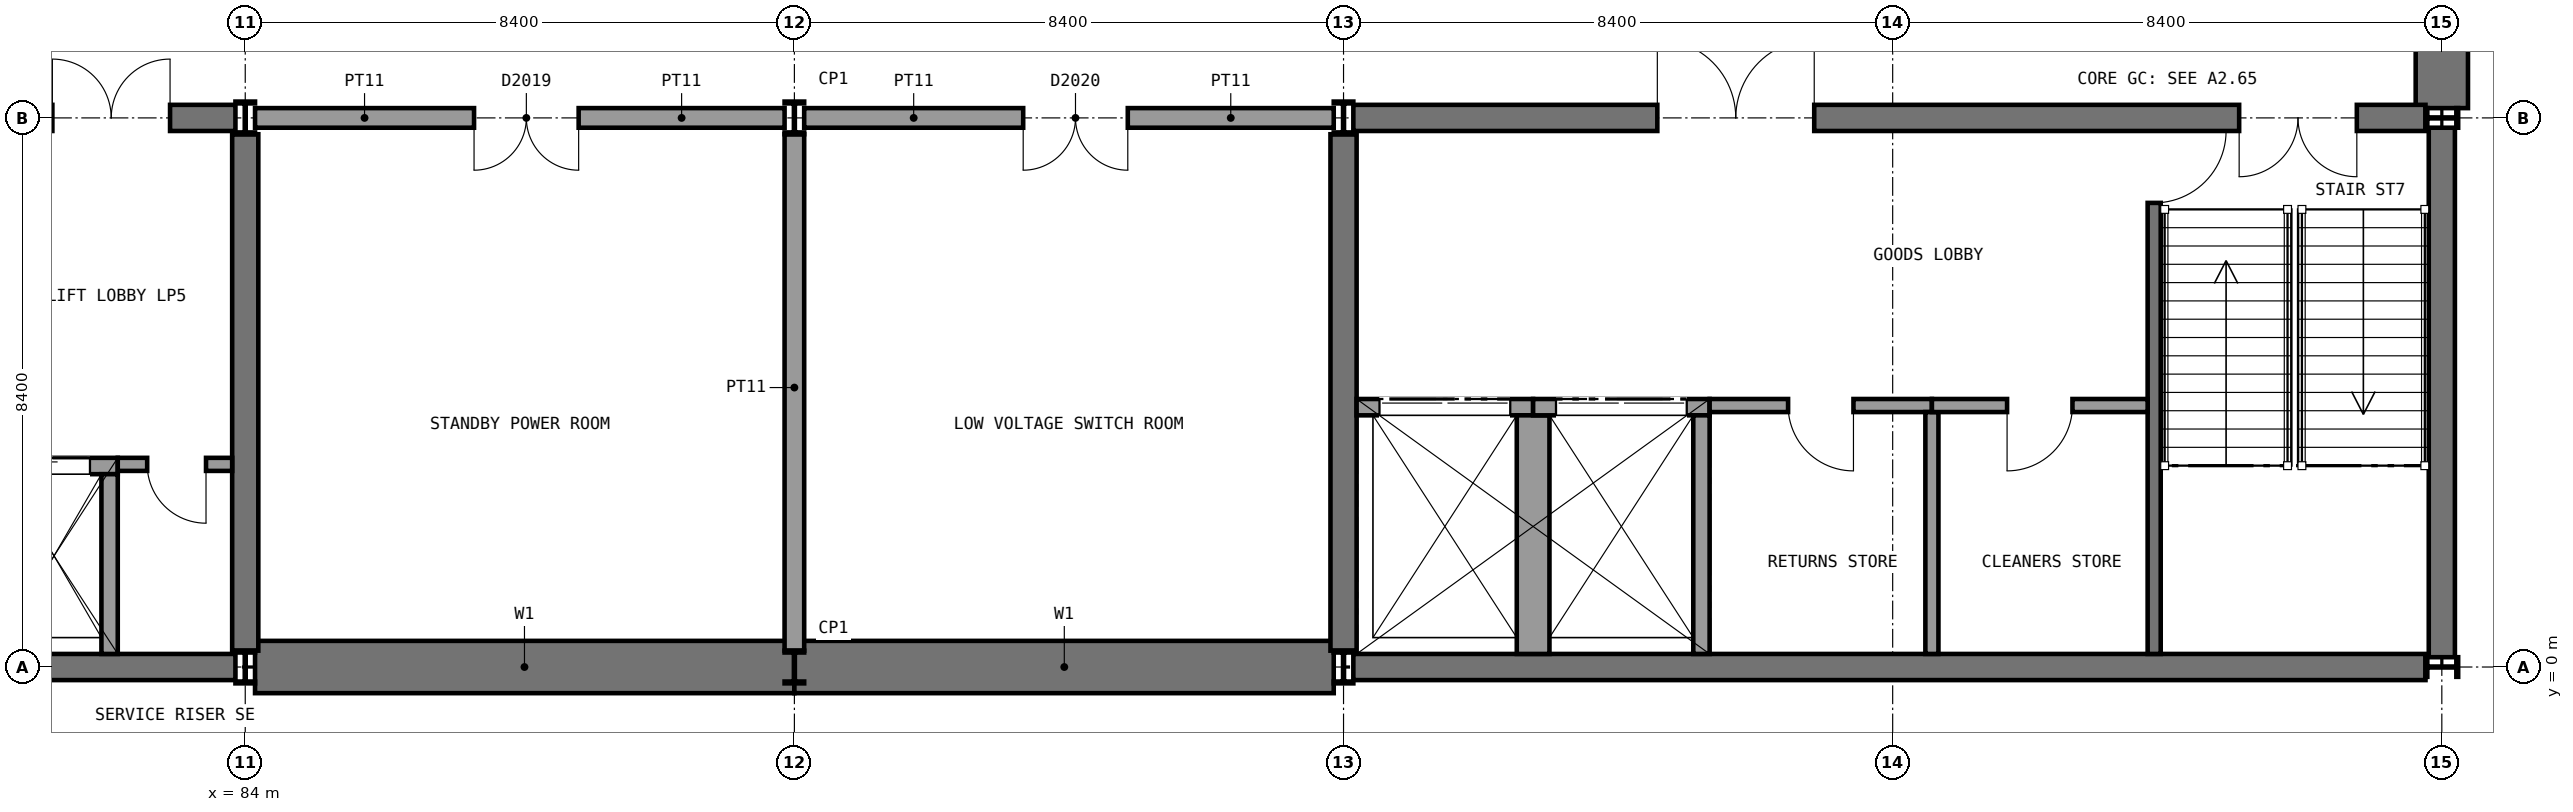
"""IFC4 building model, lengths in metres.
Left out: names, types, materials, properties, quantities, classifications, styles, units other than length and angle.
Written with IfcOpenShell. Run it as: python <this file> out.ifc"""

import sys

from ifc_helpers import new_model, si_unit, direction, frame, frame_2d, origin, origin_2d, place, context, subcontext, project, spatial, rectangle, i_section, extrude, element, fill, save


model = new_model("IFC4")
c1 = context("Model", 3, precision=1e-05, world=origin(), true_north=direction((0.0, 1.0)))
c2 = subcontext(c1, "Body", "Model", "MODEL_VIEW")
j1 = project(units=[si_unit("LENGTHUNIT", "METRE"), si_unit("PLANEANGLEUNIT", "RADIAN")], contexts=[c1])
p1 = place(None, origin())
s1 = spatial("IfcSite", under=j1, at=p1, CompositionType="ELEMENT")
p2 = place(p1, origin())
s2 = spatial("IfcBuilding", under=s1, at=p2, CompositionType="ELEMENT")
p3 = place(p2, frame((0.0, 0.0, -9.9)))
s3 = spatial("IfcBuildingStorey", under=s2, at=p3, CompositionType="ELEMENT", Elevation=-9.9)
p4 = place(p3, frame((84.15, 0.0, 0.0), z_axis=(0.0, 0.0, 1.0), x_axis=(1.0, 0.0, 0.0)))
e1 = element("IfcWall", 1, at=p4, inside=s3, PredefinedType="SOLIDWALL", context=c2, shape_type="SweptSolid", body=[
    extrude(rectangle(XDim=8.25, YDim=0.8, at=frame_2d((4.125, 0.0))), origin(), (0.0, 0.0, 1.0), 4.65),
])
for number, where, z_axis, x_axis in (
    (2, (92.4, 0.0, 0.0), (0.0, 0.0, 1.0), (1.0, 0.0, 0.0)),
    (3, (117.6, 8.55, 0.0), (0.0, 0.0, 1.0), (0.0, 1.0, 0.0)),
):
    element("IfcWall", number, at=place(p3, frame(where, z_axis=z_axis, x_axis=x_axis)), inside=s3, PredefinedType="SOLIDWALL", context=c2, shape_type="SweptSolid", body=[
        extrude(rectangle(XDim=8.25, YDim=0.8, at=frame_2d((4.125, 0.0))), origin(), (0.0, 0.0, 1.0), 4.65),
    ])
p5 = place(p3, frame((75.75, 0.0, 0.0), z_axis=(0.0, 0.0, 1.0), x_axis=(1.0, 0.0, 0.0)))
e4 = element("IfcWall", 4, at=p5, inside=s3, PredefinedType="SHEAR", context=c2, shape_type="SweptSolid", body=[
    extrude(rectangle(XDim=8.1, YDim=0.4, at=frame_2d((4.05, 0.0))), origin(), (0.0, 0.0, 1.0), 4.65),
])
p6 = place(p3, frame((75.75, 8.4, 0.0), z_axis=(0.0, 0.0, 1.0), x_axis=(1.0, 0.0, 0.0)))
e5 = element("IfcWall", 5, at=p6, inside=s3, PredefinedType="SHEAR", context=c2, shape_type="SweptSolid", body=[
    extrude(rectangle(XDim=8.1, YDim=0.4, at=frame_2d((4.05, 0.0))), origin(), (0.0, 0.0, 1.0), 4.65),
])
p7 = place(p6, frame((1.15, 0.0, 0.0)))
e6 = element("IfcOpeningElement", 6, at=p7, cuts=e5, PredefinedType="OPENING", context=c2, shape_type="SweptSolid", body=[
    extrude(rectangle(XDim=1.8, YDim=2.1, at=frame_2d((0.9, 1.05))), frame((0.0, 0.21, 0.0), z_axis=(0.0, -1.0, 0.0), x_axis=(1.0, 0.0, 0.0)), (0.0, 0.0, 1.0), 0.42),
])
p8 = place(p6, frame((5.3, 0.0, 0.0)))
e7 = element("IfcOpeningElement", 7, at=p8, cuts=e5, PredefinedType="OPENING", context=c2, shape_type="SweptSolid", body=[
    extrude(rectangle(XDim=1.8, YDim=2.1, at=frame_2d((0.9, 1.05))), frame((0.0, 0.21, 0.0), z_axis=(0.0, -1.0, 0.0), x_axis=(1.0, 0.0, 0.0)), (0.0, 0.0, 1.0), 0.42),
])
p9 = place(p3, frame((84.0, 0.25, 0.0), z_axis=(0.0, 0.0, 1.0), x_axis=(0.0, 1.0, 0.0)))
e8 = element("IfcWall", 8, at=p9, inside=s3, PredefinedType="SHEAR", context=c2, shape_type="SweptSolid", body=[
    extrude(rectangle(XDim=7.9, YDim=0.4, at=frame_2d((3.95, 0.0))), origin(), (0.0, 0.0, 1.0), 4.65),
])
p10 = place(p3, frame((100.95, 0.0, 0.0), z_axis=(0.0, 0.0, 1.0), x_axis=(1.0, 0.0, 0.0)))
e9 = element("IfcWall", 9, at=p10, inside=s3, PredefinedType="SHEAR", context=c2, shape_type="SweptSolid", body=[
    extrude(rectangle(XDim=16.4, YDim=0.4, at=frame_2d((8.2, 0.0))), origin(), (0.0, 0.0, 1.0), 4.65),
])
p11 = place(p3, frame((100.95, 8.4, 0.0), z_axis=(0.0, 0.0, 1.0), x_axis=(1.0, 0.0, 0.0)))
e10 = element("IfcWall", 10, at=p11, inside=s3, PredefinedType="SHEAR", context=c2, shape_type="SweptSolid", body=[
    extrude(rectangle(XDim=16.4, YDim=0.4, at=frame_2d((8.2, 0.0))), origin(), (0.0, 0.0, 1.0), 4.65),
])
p12 = place(p11, frame((13.55, 0.0, 0.0)))
e11 = element("IfcOpeningElement", 11, at=p12, cuts=e10, PredefinedType="OPENING", context=c2, shape_type="SweptSolid", body=[
    extrude(rectangle(XDim=1.8, YDim=2.1, at=frame_2d((0.9, 1.05))), frame((0.0, 0.21, 0.0), z_axis=(0.0, -1.0, 0.0), x_axis=(1.0, 0.0, 0.0)), (0.0, 0.0, 1.0), 0.42),
])
p13 = place(p11, frame((4.65, 0.0, 0.0)))
e12 = element("IfcOpeningElement", 12, at=p13, cuts=e10, PredefinedType="OPENING", context=c2, shape_type="SweptSolid", body=[
    extrude(rectangle(XDim=2.4, YDim=2.4, at=frame_2d((1.2, 1.2))), frame((0.0, 0.21, 0.0), z_axis=(0.0, -1.0, 0.0), x_axis=(1.0, 0.0, 0.0)), (0.0, 0.0, 1.0), 0.42),
])
p14 = place(p3, frame((100.8, 0.25, 0.0), z_axis=(0.0, 0.0, 1.0), x_axis=(0.0, 1.0, 0.0)))
e13 = element("IfcWall", 13, at=p14, inside=s3, PredefinedType="SHEAR", context=c2, shape_type="SweptSolid", body=[
    extrude(rectangle(XDim=7.9, YDim=0.4, at=frame_2d((3.95, 0.0))), origin(), (0.0, 0.0, 1.0), 4.65),
])
p15 = place(p3, frame((117.6, 0.15, 0.0), z_axis=(0.0, 0.0, 1.0), x_axis=(0.0, 1.0, 0.0)))
e14 = element("IfcWall", 14, at=p15, inside=s3, PredefinedType="SHEAR", context=c2, shape_type="SweptSolid", body=[
    extrude(rectangle(XDim=8.1, YDim=0.4, at=frame_2d((4.05, 0.0))), origin(), (0.0, 0.0, 1.0), 4.65),
])
for number, where, z_axis, x_axis in (
    (15, (84.0, 0.0, 0.0), (0.0, 0.0, 1.0), (1.0, 0.0, 0.0)),
    (16, (84.0, 8.4, 0.0), (0.0, 0.0, 1.0), (1.0, 0.0, 0.0)),
    (17, (92.4, 0.0, 0.0), (0.0, 0.0, 1.0), (1.0, 0.0, 0.0)),
    (18, (92.4, 8.4, 0.0), (0.0, 0.0, 1.0), (1.0, 0.0, 0.0)),
    (19, (100.8, 0.0, 0.0), (0.0, 0.0, 1.0), (1.0, 0.0, 0.0)),
    (20, (100.8, 8.4, 0.0), (0.0, 0.0, 1.0), (1.0, 0.0, 0.0)),
    (21, (117.6, 0.0, 0.0), (0.0, 0.0, 1.0), (0.0, 1.0, 0.0)),
    (22, (117.6, 8.4, 0.0), (0.0, 0.0, 1.0), (0.0, 1.0, 0.0)),
):
    element("IfcColumn", number, at=place(p3, frame(where, z_axis=z_axis, x_axis=x_axis)), inside=s3, PredefinedType="COLUMN", context=c2, shape_type="SweptSolid", body=[
        extrude(i_section(OverallWidth=0.3, OverallDepth=0.5, WebThickness=0.014, FlangeThickness=0.028, FilletRadius=0.027, at=origin_2d()), origin(), (0.0, 0.0, 1.0), 5.0),
    ])
p16 = place(p3, frame((84.15, 8.4, 0.0), z_axis=(0.0, 0.0, 1.0), x_axis=(1.0, 0.0, 0.0)))
e23 = element("IfcWall", 23, at=p16, inside=s3, PredefinedType="SOLIDWALL", context=c2, shape_type="SweptSolid", body=[
    extrude(rectangle(XDim=8.1, YDim=0.3, at=frame_2d((4.05, 0.0))), origin(), (0.0, 0.0, 1.0), 4.65),
])
p17 = place(p16, frame((3.35, 0.0, 0.0)))
e24 = element("IfcOpeningElement", 24, at=p17, cuts=e23, PredefinedType="OPENING", context=c2, shape_type="SweptSolid", body=[
    extrude(rectangle(XDim=1.6, YDim=2.2, at=frame_2d((0.8, 1.1))), frame((0.0, 0.16, 0.0), z_axis=(0.0, -1.0, 0.0), x_axis=(1.0, 0.0, 0.0)), (0.0, 0.0, 1.0), 0.32),
])
p18 = place(p3, frame((92.55, 8.4, 0.0), z_axis=(0.0, 0.0, 1.0), x_axis=(1.0, 0.0, 0.0)))
e25 = element("IfcWall", 25, at=p18, inside=s3, PredefinedType="SOLIDWALL", context=c2, shape_type="SweptSolid", body=[
    extrude(rectangle(XDim=8.1, YDim=0.3, at=frame_2d((4.05, 0.0))), origin(), (0.0, 0.0, 1.0), 4.65),
])
p19 = place(p18, frame((3.35, 0.0, 0.0)))
e26 = element("IfcOpeningElement", 26, at=p19, cuts=e25, PredefinedType="OPENING", context=c2, shape_type="SweptSolid", body=[
    extrude(rectangle(XDim=1.6, YDim=2.2, at=frame_2d((0.8, 1.1))), frame((0.0, 0.16, 0.0), z_axis=(0.0, -1.0, 0.0), x_axis=(1.0, 0.0, 0.0)), (0.0, 0.0, 1.0), 0.32),
])
p20 = place(p3, frame((92.4, 0.25, 0.0), z_axis=(0.0, 0.0, 1.0), x_axis=(0.0, 1.0, 0.0)))
e27 = element("IfcWall", 27, at=p20, inside=s3, PredefinedType="SOLIDWALL", context=c2, shape_type="SweptSolid", body=[
    extrude(rectangle(XDim=7.9, YDim=0.3, at=frame_2d((3.95, 0.0))), origin(), (0.0, 0.0, 1.0), 4.65),
])
p21 = place(p3, frame((80.1, 3.075, -1.4), z_axis=(0.0, 0.0, 1.0), x_axis=(1.0, 0.0, 0.0)))
e28 = element("IfcWall", 28, at=p21, inside=s3, PredefinedType="SOLIDWALL", context=c2, shape_type="SweptSolid", body=[
    extrude(rectangle(XDim=1.95, YDim=0.25, at=frame_2d((0.975, 0.0))), origin(), (0.0, 0.0, 1.0), 6.4),
])
p22 = place(p21, frame((0.425, 0.0, 1.4)))
e29 = element("IfcOpeningElement", 29, at=p22, cuts=e28, PredefinedType="OPENING", context=c2, shape_type="SweptSolid", body=[
    extrude(rectangle(XDim=1.1, YDim=2.1, at=frame_2d((0.55, 1.05))), frame((0.0, 0.135, 0.0), z_axis=(0.0, -1.0, 0.0), x_axis=(1.0, 0.0, 0.0)), (0.0, 0.0, 1.0), 0.27),
])
p23 = place(p3, frame((81.925, 0.2, -1.4), z_axis=(0.0, 0.0, 1.0), x_axis=(0.0, 1.0, 0.0)))
e30 = element("IfcWall", 30, at=p23, inside=s3, PredefinedType="SOLIDWALL", context=c2, shape_type="SweptSolid", body=[
    extrude(rectangle(XDim=2.75, YDim=0.25, at=frame_2d((1.375, 0.0))), origin(), (0.0, 0.0, 1.0), 6.4),
])
p24 = place(p3, frame((82.05, 3.1, 0.0), z_axis=(0.0, 0.0, 1.0), x_axis=(1.0, 0.0, 0.0)))
e31 = element("IfcWall", 31, at=p24, inside=s3, PredefinedType="PARTITIONING", context=c2, shape_type="SweptSolid", body=[
    extrude(rectangle(XDim=1.75, YDim=0.2, at=frame_2d((0.875, 0.0))), origin(), (0.0, 0.0, 1.0), 4.65),
])
p25 = place(p24, frame((0.45, 0.0, 0.0)))
e32 = element("IfcOpeningElement", 32, at=p25, cuts=e31, PredefinedType="OPENING", context=c2, shape_type="SweptSolid", body=[
    extrude(rectangle(XDim=0.9, YDim=2.1, at=frame_2d((0.45, 1.05))), frame((0.0, 0.11, 0.0), z_axis=(0.0, -1.0, 0.0), x_axis=(1.0, 0.0, 0.0)), (0.0, 0.0, 1.0), 0.22),
])
p26 = place(p3, frame((113.2, 0.2, 0.0), z_axis=(0.0, 0.0, 1.0), x_axis=(0.0, 1.0, 0.0)))
e33 = element("IfcWall", 33, at=p26, inside=s3, PredefinedType="SHEAR", context=c2, shape_type="SweptSolid", body=[
    extrude(rectangle(XDim=8.0, YDim=0.2, at=frame_2d((4.0, 0.0))), origin(), (0.0, 0.0, 1.0), 4.65),
])
p27 = place(p26, frame((6.9, 0.0, 0.0)))
e34 = element("IfcOpeningElement", 34, at=p27, cuts=e33, PredefinedType="OPENING", context=c2, shape_type="SweptSolid", body=[
    extrude(rectangle(XDim=1.11, YDim=2.1, at=frame_2d((0.555, 1.05))), frame((0.0, 0.11, 0.0), z_axis=(0.0, -1.0, 0.0), x_axis=(1.0, 0.0, 0.0)), (0.0, 0.0, 1.0), 0.22),
])
p28 = place(p3, frame((101.0, 3.975, -1.4), z_axis=(0.0, 0.0, 1.0), x_axis=(1.0, 0.0, 0.0)))
e35 = element("IfcWall", 35, at=p28, inside=s3, PredefinedType="SOLIDWALL", context=c2, shape_type="SweptSolid", body=[
    extrude(rectangle(XDim=2.7, YDim=0.25, at=frame_2d((1.35, 0.0))), origin(), (0.0, 0.0, 1.0), 6.4),
])
p29 = place(p28, frame((0.35, 0.0, 1.4)))
e36 = element("IfcOpeningElement", 36, at=p29, cuts=e35, PredefinedType="OPENING", context=c2, shape_type="SweptSolid", body=[
    extrude(rectangle(XDim=2.0, YDim=2.2, at=frame_2d((1.0, 1.1))), frame((0.0, 0.135, 0.0), z_axis=(0.0, -1.0, 0.0), x_axis=(1.0, 0.0, 0.0)), (0.0, 0.0, 1.0), 0.27),
])
p30 = place(p3, frame((103.7, 0.2, -1.4), z_axis=(0.0, 0.0, 1.0), x_axis=(0.0, 1.0, 0.0)))
e37 = element("IfcWall", 37, at=p30, inside=s3, PredefinedType="SOLIDWALL", context=c2, shape_type="SweptSolid", body=[
    extrude(rectangle(XDim=3.65, YDim=0.5, at=frame_2d((1.825, 0.0))), origin(), (0.0, 0.0, 1.0), 6.4),
])
p31 = place(p3, frame((103.7, 3.975, -1.4), z_axis=(0.0, 0.0, 1.0), x_axis=(1.0, 0.0, 0.0)))
e38 = element("IfcWall", 38, at=p31, inside=s3, PredefinedType="SOLIDWALL", context=c2, shape_type="SweptSolid", body=[
    extrude(rectangle(XDim=2.7, YDim=0.25, at=frame_2d((1.35, 0.0))), origin(), (0.0, 0.0, 1.0), 6.4),
])
p32 = place(p31, frame((0.35, 0.0, 1.4)))
e39 = element("IfcOpeningElement", 39, at=p32, cuts=e38, PredefinedType="OPENING", context=c2, shape_type="SweptSolid", body=[
    extrude(rectangle(XDim=2.0, YDim=2.2, at=frame_2d((1.0, 1.1))), frame((0.0, 0.135, 0.0), z_axis=(0.0, -1.0, 0.0), x_axis=(1.0, 0.0, 0.0)), (0.0, 0.0, 1.0), 0.27),
])
p33 = place(p3, frame((106.275, 0.2, -1.4), z_axis=(0.0, 0.0, 1.0), x_axis=(0.0, 1.0, 0.0)))
e40 = element("IfcWall", 40, at=p33, inside=s3, PredefinedType="SOLIDWALL", context=c2, shape_type="SweptSolid", body=[
    extrude(rectangle(XDim=3.65, YDim=0.25, at=frame_2d((1.825, 0.0))), origin(), (0.0, 0.0, 1.0), 6.4),
])
p34 = place(p3, frame((106.4, 4.0, 0.0), z_axis=(0.0, 0.0, 1.0), x_axis=(1.0, 0.0, 0.0)))
e41 = element("IfcWall", 41, at=p34, inside=s3, PredefinedType="PARTITIONING", context=c2, shape_type="SweptSolid", body=[
    extrude(rectangle(XDim=3.4, YDim=0.2, at=frame_2d((1.7, 0.0))), origin(), (0.0, 0.0, 1.0), 4.65),
])
p35 = place(p34, frame((1.2, 0.0, 0.0)))
e42 = element("IfcOpeningElement", 42, at=p35, cuts=e41, PredefinedType="OPENING", context=c2, shape_type="SweptSolid", body=[
    extrude(rectangle(XDim=1.0, YDim=2.1, at=frame_2d((0.5, 1.05))), frame((0.0, 0.11, 0.0), z_axis=(0.0, -1.0, 0.0), x_axis=(1.0, 0.0, 0.0)), (0.0, 0.0, 1.0), 0.22),
])
p36 = place(p3, frame((109.8, 0.2, 0.0), z_axis=(0.0, 0.0, 1.0), x_axis=(0.0, 1.0, 0.0)))
e43 = element("IfcWall", 43, at=p36, inside=s3, PredefinedType="PARTITIONING", context=c2, shape_type="SweptSolid", body=[
    extrude(rectangle(XDim=3.7, YDim=0.2, at=frame_2d((1.85, 0.0))), origin(), (0.0, 0.0, 1.0), 4.65),
])
p37 = place(p3, frame((109.8, 4.0, 0.0), z_axis=(0.0, 0.0, 1.0), x_axis=(1.0, 0.0, 0.0)))
e44 = element("IfcWall", 44, at=p37, inside=s3, PredefinedType="PARTITIONING", context=c2, shape_type="SweptSolid", body=[
    extrude(rectangle(XDim=3.3, YDim=0.2, at=frame_2d((1.65, 0.0))), origin(), (0.0, 0.0, 1.0), 4.65),
])
p38 = place(p37, frame((1.15, 0.0, 0.0)))
e45 = element("IfcOpeningElement", 45, at=p38, cuts=e44, PredefinedType="OPENING", context=c2, shape_type="SweptSolid", body=[
    extrude(rectangle(XDim=1.0, YDim=2.1, at=frame_2d((0.5, 1.05))), frame((0.0, 0.11, 0.0), z_axis=(0.0, -1.0, 0.0), x_axis=(1.0, 0.0, 0.0)), (0.0, 0.0, 1.0), 0.22),
])
p39 = place(p17, frame((1.6, 0.0, 0.0), z_axis=(0.0, 0.0, 1.0), x_axis=(-1.0, 0.0, 0.0)))
e46 = element("IfcDoor", 46, at=p39, inside=s3, OperationType="DOUBLE_DOOR_SINGLE_SWING", PredefinedType="DOOR", context=c2, shape_type="SweptSolid", body=[
    extrude(rectangle(XDim=1.6, YDim=2.2, at=frame_2d((0.8, 1.1))), frame((0.0, 0.025, 0.0), z_axis=(0.0, -1.0, 0.0), x_axis=(1.0, 0.0, 0.0)), (0.0, 0.0, 1.0), 0.05),
])
fill(e24, e46)
p40 = place(p19, frame((1.6, 0.0, 0.0), z_axis=(0.0, 0.0, 1.0), x_axis=(-1.0, 0.0, 0.0)))
e47 = element("IfcDoor", 47, at=p40, inside=s3, OperationType="DOUBLE_DOOR_SINGLE_SWING", PredefinedType="DOOR", context=c2, shape_type="SweptSolid", body=[
    extrude(rectangle(XDim=1.6, YDim=2.2, at=frame_2d((0.8, 1.1))), frame((0.0, 0.025, 0.0), z_axis=(0.0, -1.0, 0.0), x_axis=(1.0, 0.0, 0.0)), (0.0, 0.0, 1.0), 0.05),
])
fill(e26, e47)
p41 = place(p22, origin())
e48 = element("IfcDoor", 48, at=p41, inside=s3, OperationType="SLIDING_TO_LEFT", PredefinedType="DOOR", context=c2, shape_type="SweptSolid", body=[
    extrude(rectangle(XDim=1.1, YDim=2.1, at=frame_2d((0.55, 1.05))), frame((0.0, 0.025, 0.0), z_axis=(0.0, -1.0, 0.0), x_axis=(1.0, 0.0, 0.0)), (0.0, 0.0, 1.0), 0.05),
])
fill(e29, e48)
p42 = place(p25, frame((0.9, 0.0, 0.0), z_axis=(0.0, 0.0, 1.0), x_axis=(-1.0, 0.0, 0.0)))
e49 = element("IfcDoor", 49, at=p42, inside=s3, OperationType="SINGLE_SWING_LEFT", PredefinedType="DOOR", context=c2, shape_type="SweptSolid", body=[
    extrude(rectangle(XDim=0.9, YDim=2.1, at=frame_2d((0.45, 1.05))), frame((0.0, 0.025, 0.0), z_axis=(0.0, -1.0, 0.0), x_axis=(1.0, 0.0, 0.0)), (0.0, 0.0, 1.0), 0.05),
])
fill(e32, e49)
p43 = place(p8, origin())
e50 = element("IfcDoor", 50, at=p43, inside=s3, OperationType="DOUBLE_DOOR_SINGLE_SWING", PredefinedType="DOOR", context=c2, shape_type="SweptSolid", body=[
    extrude(rectangle(XDim=1.8, YDim=2.1, at=frame_2d((0.9, 1.05))), frame((0.0, 0.025, 0.0), z_axis=(0.0, -1.0, 0.0), x_axis=(1.0, 0.0, 0.0)), (0.0, 0.0, 1.0), 0.05),
])
fill(e7, e50)
p44 = place(p27, frame((1.1, 0.0, 0.0), z_axis=(0.0, 0.0, 1.0), x_axis=(-1.0, 0.0, 0.0)))
e51 = element("IfcDoor", 51, at=p44, inside=s3, OperationType="SINGLE_SWING_LEFT", PredefinedType="DOOR", context=c2, shape_type="SweptSolid", body=[
    extrude(rectangle(XDim=1.1, YDim=2.1, at=frame_2d((0.55, 1.05))), frame((0.0, 0.025, 0.0), z_axis=(0.0, -1.0, 0.0), x_axis=(1.0, 0.0, 0.0)), (0.0, 0.0, 1.0), 0.05),
])
fill(e34, e51)
p45 = place(p29, origin())
e52 = element("IfcDoor", 52, at=p45, inside=s3, OperationType="DOUBLE_DOOR_SLIDING", PredefinedType="DOOR", context=c2, shape_type="SweptSolid", body=[
    extrude(rectangle(XDim=2.0, YDim=2.2, at=frame_2d((1.0, 1.1))), frame((0.0, 0.025, 0.0), z_axis=(0.0, -1.0, 0.0), x_axis=(1.0, 0.0, 0.0)), (0.0, 0.0, 1.0), 0.05),
])
fill(e36, e52)
p46 = place(p32, origin())
e53 = element("IfcDoor", 53, at=p46, inside=s3, OperationType="DOUBLE_DOOR_SLIDING", PredefinedType="DOOR", context=c2, shape_type="SweptSolid", body=[
    extrude(rectangle(XDim=2.0, YDim=2.2, at=frame_2d((1.0, 1.1))), frame((0.0, 0.025, 0.0), z_axis=(0.0, -1.0, 0.0), x_axis=(1.0, 0.0, 0.0)), (0.0, 0.0, 1.0), 0.05),
])
fill(e39, e53)
p47 = place(p35, frame((1.0, 0.0, 0.0), z_axis=(0.0, 0.0, 1.0), x_axis=(-1.0, 0.0, 0.0)))
e54 = element("IfcDoor", 54, at=p47, inside=s3, OperationType="SINGLE_SWING_LEFT", PredefinedType="DOOR", context=c2, shape_type="SweptSolid", body=[
    extrude(rectangle(XDim=1.0, YDim=2.1, at=frame_2d((0.5, 1.05))), frame((0.0, 0.025, 0.0), z_axis=(0.0, -1.0, 0.0), x_axis=(1.0, 0.0, 0.0)), (0.0, 0.0, 1.0), 0.05),
])
fill(e42, e54)
p48 = place(p38, frame((1.0, 0.0, 0.0), z_axis=(0.0, 0.0, 1.0), x_axis=(-1.0, 0.0, 0.0)))
e55 = element("IfcDoor", 55, at=p48, inside=s3, OperationType="SINGLE_SWING_RIGHT", PredefinedType="DOOR", context=c2, shape_type="SweptSolid", body=[
    extrude(rectangle(XDim=1.0, YDim=2.1, at=frame_2d((0.5, 1.05))), frame((0.0, 0.025, 0.0), z_axis=(0.0, -1.0, 0.0), x_axis=(1.0, 0.0, 0.0)), (0.0, 0.0, 1.0), 0.05),
])
fill(e45, e55)
p49 = place(p12, frame((1.8, 0.0, 0.0), z_axis=(0.0, 0.0, 1.0), x_axis=(-1.0, 0.0, 0.0)))
e56 = element("IfcDoor", 56, at=p49, inside=s3, OperationType="DOUBLE_DOOR_SINGLE_SWING", PredefinedType="DOOR", context=c2, shape_type="SweptSolid", body=[
    extrude(rectangle(XDim=1.8, YDim=2.1, at=frame_2d((0.9, 1.05))), frame((0.0, 0.025, 0.0), z_axis=(0.0, -1.0, 0.0), x_axis=(1.0, 0.0, 0.0)), (0.0, 0.0, 1.0), 0.05),
])
fill(e11, e56)
p50 = place(p13, origin())
e57 = element("IfcDoor", 57, at=p50, inside=s3, OperationType="DOUBLE_DOOR_SINGLE_SWING", PredefinedType="DOOR", context=c2, shape_type="SweptSolid", body=[
    extrude(rectangle(XDim=2.4, YDim=2.4, at=frame_2d((1.2, 1.2))), frame((0.0, 0.025, 0.0), z_axis=(0.0, -1.0, 0.0), x_axis=(1.0, 0.0, 0.0)), (0.0, 0.0, 1.0), 0.05),
])
fill(e12, e57)
save(model, sys.argv[1])
